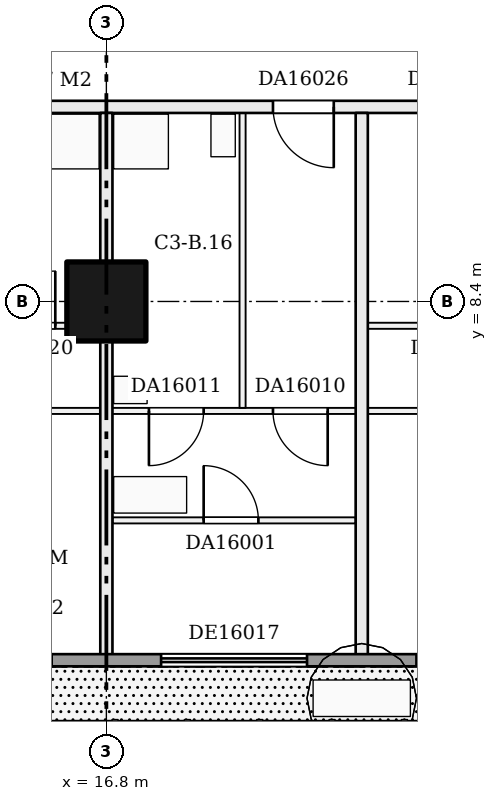
"""IFC4 building model, lengths in metres.
Left out: names, types, materials, properties, quantities, classifications, styles, units other than length and angle.
Written with IfcOpenShell. Run it as: python <this file> out.ifc"""

import sys

from ifc_helpers import new_model, si_unit, direction, frame, frame_2d, origin, origin_2d, place, context, subcontext, project, spatial, rectangle, extrude, element, fill, save


model = new_model("IFC4")
c1 = context("Model", 3, precision=1e-05, world=origin(), true_north=direction((0.0, 1.0)))
c2 = subcontext(c1, "Body", "Model", "MODEL_VIEW")
j1 = project(units=[si_unit("LENGTHUNIT", "METRE"), si_unit("PLANEANGLEUNIT", "RADIAN")], contexts=[c1])
p1 = place(None, origin())
s1 = spatial("IfcSite", under=j1, at=p1, CompositionType="ELEMENT")
p2 = place(p1, origin())
s2 = spatial("IfcBuilding", under=s1, at=p2, CompositionType="ELEMENT")
p3 = place(p2, frame((0.0, 0.0, 67.2)))
s3 = spatial("IfcBuildingStorey", under=s2, at=p3, CompositionType="ELEMENT", Elevation=67.2)
p4 = place(p3, frame((16.8, 8.4, 0.0), z_axis=(0.0, 0.0, 1.0), x_axis=(1.0, 0.0, 0.0)))
e1 = element("IfcColumn", 1, at=p4, inside=s3, PredefinedType="COLUMN", context=c2, shape_type="SweptSolid", body=[
    extrude(rectangle(XDim=1.3, YDim=1.3, at=origin_2d()), origin(), (0.0, 0.0, 1.0), 3.22),
])
p5 = place(p3, frame((16.9, 4.8, 0.0), z_axis=(0.0, 0.0, 1.0), x_axis=(1.0, 0.0, 0.0)))
e2 = element("IfcWall", 2, at=p5, inside=s3, PredefinedType="PARTITIONING", context=c2, shape_type="SweptSolid", body=[
    extrude(rectangle(XDim=4.0, YDim=0.1, at=frame_2d((2.0, 0.0))), origin(), (0.0, 0.0, 1.0), 3.22),
])
p6 = place(p5, frame((1.5, 0.0, 0.0)))
e3 = element("IfcOpeningElement", 3, at=p6, cuts=e2, PredefinedType="OPENING", context=c2, shape_type="SweptSolid", body=[
    extrude(rectangle(XDim=0.9, YDim=2.1, at=frame_2d((0.45, 1.05))), frame((0.0, 0.06, 0.0), z_axis=(0.0, -1.0, 0.0), x_axis=(1.0, 0.0, 0.0)), (0.0, 0.0, 1.0), 0.12),
])
p7 = place(p3, frame((12.65, 6.6, 0.0), z_axis=(0.0, 0.0, 1.0), x_axis=(1.0, 0.0, 0.0)))
e4 = element("IfcWall", 4, at=p7, inside=s3, PredefinedType="PARTITIONING", context=c2, shape_type="SweptSolid", body=[
    extrude(rectangle(XDim=29.25, YDim=0.1, at=frame_2d((14.625, 0.0))), origin(), (0.0, 0.0, 1.0), 3.22),
])
p8 = place(p7, frame((1.65, 0.0, 0.0)))
e5 = element("IfcOpeningElement", 5, at=p8, cuts=e4, PredefinedType="OPENING", context=c2, shape_type="SweptSolid", body=[
    extrude(rectangle(XDim=0.9, YDim=2.1, at=frame_2d((0.45, 1.05))), frame((0.0, 0.06, 0.0), z_axis=(0.0, -1.0, 0.0), x_axis=(1.0, 0.0, 0.0)), (0.0, 0.0, 1.0), 0.12),
])
p9 = place(p7, frame((6.89, 0.0, 0.0)))
e6 = element("IfcOpeningElement", 6, at=p9, cuts=e4, PredefinedType="OPENING", context=c2, shape_type="SweptSolid", body=[
    extrude(rectangle(XDim=0.9, YDim=2.1, at=frame_2d((0.45, 1.05))), frame((0.0, 0.06, 0.0), z_axis=(0.0, -1.0, 0.0), x_axis=(1.0, 0.0, 0.0)), (0.0, 0.0, 1.0), 0.12),
])
p10 = place(p7, frame((4.85, 0.0, 0.0)))
e7 = element("IfcOpeningElement", 7, at=p10, cuts=e4, PredefinedType="OPENING", context=c2, shape_type="SweptSolid", body=[
    extrude(rectangle(XDim=0.9, YDim=2.1, at=frame_2d((0.45, 1.05))), frame((0.0, 0.06, 0.0), z_axis=(0.0, -1.0, 0.0), x_axis=(1.0, 0.0, 0.0)), (0.0, 0.0, 1.0), 0.12),
])
p11 = place(p7, frame((10.05, 0.0, 0.0)))
e8 = element("IfcOpeningElement", 8, at=p11, cuts=e4, PredefinedType="OPENING", context=c2, shape_type="SweptSolid", body=[
    extrude(rectangle(XDim=0.9, YDim=2.1, at=frame_2d((0.45, 1.05))), frame((0.0, 0.06, 0.0), z_axis=(0.0, -1.0, 0.0), x_axis=(1.0, 0.0, 0.0)), (0.0, 0.0, 1.0), 0.12),
])
p12 = place(p7, frame((16.25, 0.0, 0.0)))
e9 = element("IfcOpeningElement", 9, at=p12, cuts=e4, PredefinedType="OPENING", context=c2, shape_type="SweptSolid", body=[
    extrude(rectangle(XDim=0.9, YDim=2.1, at=frame_2d((0.45, 1.05))), frame((0.0, 0.06, 0.0), z_axis=(0.0, -1.0, 0.0), x_axis=(1.0, 0.0, 0.0)), (0.0, 0.0, 1.0), 0.12),
])
p13 = place(p7, frame((22.55, 0.0, 0.0)))
e10 = element("IfcOpeningElement", 10, at=p13, cuts=e4, PredefinedType="OPENING", context=c2, shape_type="SweptSolid", body=[
    extrude(rectangle(XDim=0.9, YDim=2.1, at=frame_2d((0.45, 1.05))), frame((0.0, 0.06, 0.0), z_axis=(0.0, -1.0, 0.0), x_axis=(1.0, 0.0, 0.0)), (0.0, 0.0, 1.0), 0.12),
])
p14 = place(p7, frame((26.75, 0.0, 0.0)))
e11 = element("IfcOpeningElement", 11, at=p14, cuts=e4, PredefinedType="OPENING", context=c2, shape_type="SweptSolid", body=[
    extrude(rectangle(XDim=0.9, YDim=2.1, at=frame_2d((0.45, 1.05))), frame((0.0, 0.06, 0.0), z_axis=(0.0, -1.0, 0.0), x_axis=(1.0, 0.0, 0.0)), (0.0, 0.0, 1.0), 0.12),
])
p15 = place(p3, frame((12.65, 8.0, 0.0), z_axis=(0.0, 0.0, 1.0), x_axis=(1.0, 0.0, 0.0)))
e12 = element("IfcWall", 12, at=p15, inside=s3, PredefinedType="PARTITIONING", context=c2, shape_type="SweptSolid", body=[
    extrude(rectangle(XDim=4.05, YDim=0.1, at=frame_2d((2.025, 0.0))), origin(), (0.0, 0.0, 1.0), 3.22),
])
p16 = place(p15, frame((0.45, 0.0, 0.0)))
e13 = element("IfcOpeningElement", 13, at=p16, cuts=e12, PredefinedType="OPENING", context=c2, shape_type="SweptSolid", body=[
    extrude(rectangle(XDim=0.9, YDim=2.1, at=frame_2d((0.45, 1.05))), frame((0.0, 0.06, 0.0), z_axis=(0.0, -1.0, 0.0), x_axis=(1.0, 0.0, 0.0)), (0.0, 0.0, 1.0), 0.12),
])
p17 = place(p15, frame((2.41, 0.0, 0.0)))
e14 = element("IfcOpeningElement", 14, at=p17, cuts=e12, PredefinedType="OPENING", context=c2, shape_type="SweptSolid", body=[
    extrude(rectangle(XDim=0.9, YDim=2.1, at=frame_2d((0.45, 1.05))), frame((0.0, 0.06, 0.0), z_axis=(0.0, -1.0, 0.0), x_axis=(1.0, 0.0, 0.0)), (0.0, 0.0, 1.0), 0.12),
])
p18 = place(p3, frame((21.1, 8.0, 0.0), z_axis=(0.0, 0.0, 1.0), x_axis=(1.0, 0.0, 0.0)))
e15 = element("IfcWall", 15, at=p18, inside=s3, PredefinedType="PARTITIONING", context=c2, shape_type="SweptSolid", body=[
    extrude(rectangle(XDim=12.4, YDim=0.1, at=frame_2d((6.2, 0.0))), origin(), (0.0, 0.0, 1.0), 3.22),
])
p19 = place(p18, frame((1.0, 0.0, 0.0)))
e16 = element("IfcOpeningElement", 16, at=p19, cuts=e15, PredefinedType="OPENING", context=c2, shape_type="SweptSolid", body=[
    extrude(rectangle(XDim=0.9, YDim=2.1, at=frame_2d((0.45, 1.05))), frame((0.0, 0.06, 0.0), z_axis=(0.0, -1.0, 0.0), x_axis=(1.0, 0.0, 0.0)), (0.0, 0.0, 1.0), 0.12),
])
p20 = place(p18, frame((5.0, 0.0, 0.0)))
e17 = element("IfcOpeningElement", 17, at=p20, cuts=e15, PredefinedType="OPENING", context=c2, shape_type="SweptSolid", body=[
    extrude(rectangle(XDim=0.9, YDim=2.1, at=frame_2d((0.45, 1.05))), frame((0.0, 0.06, 0.0), z_axis=(0.0, -1.0, 0.0), x_axis=(1.0, 0.0, 0.0)), (0.0, 0.0, 1.0), 0.12),
])
p21 = place(p18, frame((7.6, 0.0, 0.0)))
e18 = element("IfcOpeningElement", 18, at=p21, cuts=e15, PredefinedType="OPENING", context=c2, shape_type="SweptSolid", body=[
    extrude(rectangle(XDim=0.9, YDim=2.1, at=frame_2d((0.45, 1.05))), frame((0.0, 0.06, 0.0), z_axis=(0.0, -1.0, 0.0), x_axis=(1.0, 0.0, 0.0)), (0.0, 0.0, 1.0), 0.12),
])
p22 = place(p18, frame((10.7, 0.0, 0.0)))
e19 = element("IfcOpeningElement", 19, at=p22, cuts=e15, PredefinedType="OPENING", context=c2, shape_type="SweptSolid", body=[
    extrude(rectangle(XDim=0.9, YDim=2.1, at=frame_2d((0.45, 1.05))), frame((0.0, 0.06, 0.0), z_axis=(0.0, -1.0, 0.0), x_axis=(1.0, 0.0, 0.0)), (0.0, 0.0, 1.0), 0.12),
])
p23 = place(p3, frame((11.5, 11.6, 0.0), z_axis=(0.0, 0.0, 1.0), x_axis=(1.0, 0.0, 0.0)))
e20 = element("IfcWall", 20, at=p23, inside=s3, PredefinedType="PARTITIONING", context=c2, shape_type="SweptSolid", body=[
    extrude(rectangle(XDim=30.5, YDim=0.2, at=frame_2d((15.25, 0.0))), origin(), (0.0, 0.0, 1.0), 3.22),
])
p24 = place(p23, frame((1.6, 0.0, 0.0)))
e21 = element("IfcOpeningElement", 21, at=p24, cuts=e20, PredefinedType="OPENING", context=c2, shape_type="SweptSolid", body=[
    extrude(rectangle(XDim=1.0, YDim=2.1, at=frame_2d((0.5, 1.05))), frame((0.0, 0.11, 0.0), z_axis=(0.0, -1.0, 0.0), x_axis=(1.0, 0.0, 0.0)), (0.0, 0.0, 1.0), 0.22),
])
p25 = place(p23, frame((8.04, 0.0, 0.0)))
e22 = element("IfcOpeningElement", 22, at=p25, cuts=e20, PredefinedType="OPENING", context=c2, shape_type="SweptSolid", body=[
    extrude(rectangle(XDim=1.0, YDim=2.1, at=frame_2d((0.5, 1.05))), frame((0.0, 0.11, 0.0), z_axis=(0.0, -1.0, 0.0), x_axis=(1.0, 0.0, 0.0)), (0.0, 0.0, 1.0), 0.22),
])
p26 = place(p23, frame((10.5, 0.0, 0.0)))
e23 = element("IfcOpeningElement", 23, at=p26, cuts=e20, PredefinedType="OPENING", context=c2, shape_type="SweptSolid", body=[
    extrude(rectangle(XDim=1.0, YDim=2.1, at=frame_2d((0.5, 1.05))), frame((0.0, 0.11, 0.0), z_axis=(0.0, -1.0, 0.0), x_axis=(1.0, 0.0, 0.0)), (0.0, 0.0, 1.0), 0.22),
])
p27 = place(p23, frame((28.733, 0.0, 0.0)))
e24 = element("IfcOpeningElement", 24, at=p27, cuts=e20, PredefinedType="OPENING", context=c2, shape_type="SweptSolid", body=[
    extrude(rectangle(XDim=1.0, YDim=2.1, at=frame_2d((0.5, 1.05))), frame((0.0, 0.11, 0.0), z_axis=(0.0, -1.0, 0.0), x_axis=(1.0, 0.0, 0.0)), (0.0, 0.0, 1.0), 0.22),
])
p28 = place(p3, frame((16.8, 2.5, 0.0), z_axis=(0.0, 0.0, 1.0), x_axis=(0.0, 1.0, 0.0)))
e25 = element("IfcWall", 25, at=p28, inside=s3, PredefinedType="PARTITIONING", context=c2, shape_type="SweptSolid", body=[
    extrude(rectangle(XDim=9.0, YDim=0.2, at=frame_2d((4.5, 0.0))), origin(), (0.0, 0.0, 1.0), 3.22),
])
p29 = place(p3, frame((19.04, 6.65, 0.0), z_axis=(0.0, 0.0, 1.0), x_axis=(0.0, 1.0, 0.0)))
e26 = element("IfcWall", 26, at=p29, inside=s3, PredefinedType="PARTITIONING", context=c2, shape_type="SweptSolid", body=[
    extrude(rectangle(XDim=4.85, YDim=0.1, at=frame_2d((2.425, 0.0))), origin(), (0.0, 0.0, 1.0), 3.22),
])
p30 = place(p3, frame((21.0, 2.5, 0.0), z_axis=(0.0, 0.0, 1.0), x_axis=(0.0, 1.0, 0.0)))
e27 = element("IfcWall", 27, at=p30, inside=s3, PredefinedType="PARTITIONING", context=c2, shape_type="SweptSolid", body=[
    extrude(rectangle(XDim=9.0, YDim=0.2, at=frame_2d((4.5, 0.0))), origin(), (0.0, 0.0, 1.0), 3.22),
])
p31 = place(p3, frame((4.8, 2.5, 0.0), z_axis=(0.0, 0.0, 1.0), x_axis=(1.0, 0.0, 0.0)))
e28 = element("IfcWall", 28, at=p31, inside=s3, PredefinedType="SOLIDWALL", context=c2, shape_type="SweptSolid", body=[
    extrude(rectangle(XDim=57.6, YDim=0.2, at=frame_2d((28.8, 0.0))), origin(), (0.0, 0.0, 1.0), 3.22),
])
p32 = place(p31, frame((0.3, 0.0, 0.0)))
e29 = element("IfcOpeningElement", 29, at=p32, cuts=e28, PredefinedType="OPENING", context=c2, shape_type="SweptSolid", body=[
    extrude(rectangle(XDim=2.4, YDim=2.2, at=frame_2d((1.2, 1.1))), frame((0.0, 0.11, 0.0), z_axis=(0.0, -1.0, 0.0), x_axis=(1.0, 0.0, 0.0)), (0.0, 0.0, 1.0), 0.22),
])
p33 = place(p31, frame((4.5, 0.0, 0.9)))
e30 = element("IfcOpeningElement", 30, at=p33, cuts=e28, PredefinedType="OPENING", context=c2, shape_type="SweptSolid", body=[
    extrude(rectangle(XDim=2.4, YDim=1.5, at=frame_2d((1.2, 0.75))), frame((0.0, 0.11, 0.0), z_axis=(0.0, -1.0, 0.0), x_axis=(1.0, 0.0, 0.0)), (0.0, 0.0, 1.0), 0.22),
])
p34 = place(p31, frame((8.7, 0.0, 0.9)))
e31 = element("IfcOpeningElement", 31, at=p34, cuts=e28, PredefinedType="OPENING", context=c2, shape_type="SweptSolid", body=[
    extrude(rectangle(XDim=2.4, YDim=1.5, at=frame_2d((1.2, 0.75))), frame((0.0, 0.11, 0.0), z_axis=(0.0, -1.0, 0.0), x_axis=(1.0, 0.0, 0.0)), (0.0, 0.0, 1.0), 0.22),
])
p35 = place(p31, frame((12.9, 0.0, 0.0)))
e32 = element("IfcOpeningElement", 32, at=p35, cuts=e28, PredefinedType="OPENING", context=c2, shape_type="SweptSolid", body=[
    extrude(rectangle(XDim=2.4, YDim=2.2, at=frame_2d((1.2, 1.1))), frame((0.0, 0.11, 0.0), z_axis=(0.0, -1.0, 0.0), x_axis=(1.0, 0.0, 0.0)), (0.0, 0.0, 1.0), 0.22),
])
p36 = place(p31, frame((17.1, 0.0, 0.9)))
e33 = element("IfcOpeningElement", 33, at=p36, cuts=e28, PredefinedType="OPENING", context=c2, shape_type="SweptSolid", body=[
    extrude(rectangle(XDim=2.4, YDim=1.5, at=frame_2d((1.2, 0.75))), frame((0.0, 0.11, 0.0), z_axis=(0.0, -1.0, 0.0), x_axis=(1.0, 0.0, 0.0)), (0.0, 0.0, 1.0), 0.22),
])
p37 = place(p31, frame((21.3, 0.0, 0.0)))
e34 = element("IfcOpeningElement", 34, at=p37, cuts=e28, PredefinedType="OPENING", context=c2, shape_type="SweptSolid", body=[
    extrude(rectangle(XDim=2.4, YDim=2.2, at=frame_2d((1.2, 1.1))), frame((0.0, 0.11, 0.0), z_axis=(0.0, -1.0, 0.0), x_axis=(1.0, 0.0, 0.0)), (0.0, 0.0, 1.0), 0.22),
])
p38 = place(p31, frame((25.5, 0.0, 0.0)))
e35 = element("IfcOpeningElement", 35, at=p38, cuts=e28, PredefinedType="OPENING", context=c2, shape_type="SweptSolid", body=[
    extrude(rectangle(XDim=2.4, YDim=2.2, at=frame_2d((1.2, 1.1))), frame((0.0, 0.11, 0.0), z_axis=(0.0, -1.0, 0.0), x_axis=(1.0, 0.0, 0.0)), (0.0, 0.0, 1.0), 0.22),
])
p39 = place(p31, frame((29.7, 0.0, 0.0)))
e36 = element("IfcOpeningElement", 36, at=p39, cuts=e28, PredefinedType="OPENING", context=c2, shape_type="SweptSolid", body=[
    extrude(rectangle(XDim=2.4, YDim=2.2, at=frame_2d((1.2, 1.1))), frame((0.0, 0.11, 0.0), z_axis=(0.0, -1.0, 0.0), x_axis=(1.0, 0.0, 0.0)), (0.0, 0.0, 1.0), 0.22),
])
p40 = place(p31, frame((33.9, 0.0, 0.9)))
e37 = element("IfcOpeningElement", 37, at=p40, cuts=e28, PredefinedType="OPENING", context=c2, shape_type="SweptSolid", body=[
    extrude(rectangle(XDim=2.4, YDim=1.5, at=frame_2d((1.2, 0.75))), frame((0.0, 0.11, 0.0), z_axis=(0.0, -1.0, 0.0), x_axis=(1.0, 0.0, 0.0)), (0.0, 0.0, 1.0), 0.22),
])
p41 = place(p31, frame((38.1, 0.0, 0.0)))
e38 = element("IfcOpeningElement", 38, at=p41, cuts=e28, PredefinedType="OPENING", context=c2, shape_type="SweptSolid", body=[
    extrude(rectangle(XDim=2.4, YDim=2.2, at=frame_2d((1.2, 1.1))), frame((0.0, 0.11, 0.0), z_axis=(0.0, -1.0, 0.0), x_axis=(1.0, 0.0, 0.0)), (0.0, 0.0, 1.0), 0.22),
])
p42 = place(p31, frame((42.3, 0.0, 0.9)))
e39 = element("IfcOpeningElement", 39, at=p42, cuts=e28, PredefinedType="OPENING", context=c2, shape_type="SweptSolid", body=[
    extrude(rectangle(XDim=2.4, YDim=1.5, at=frame_2d((1.2, 0.75))), frame((0.0, 0.11, 0.0), z_axis=(0.0, -1.0, 0.0), x_axis=(1.0, 0.0, 0.0)), (0.0, 0.0, 1.0), 0.22),
])
p43 = place(p31, frame((46.5, 0.0, 0.9)))
e40 = element("IfcOpeningElement", 40, at=p43, cuts=e28, PredefinedType="OPENING", context=c2, shape_type="SweptSolid", body=[
    extrude(rectangle(XDim=2.4, YDim=1.5, at=frame_2d((1.2, 0.75))), frame((0.0, 0.11, 0.0), z_axis=(0.0, -1.0, 0.0), x_axis=(1.0, 0.0, 0.0)), (0.0, 0.0, 1.0), 0.22),
])
p44 = place(p31, frame((50.7, 0.0, 0.0)))
e41 = element("IfcOpeningElement", 41, at=p44, cuts=e28, PredefinedType="OPENING", context=c2, shape_type="SweptSolid", body=[
    extrude(rectangle(XDim=2.4, YDim=2.2, at=frame_2d((1.2, 1.1))), frame((0.0, 0.11, 0.0), z_axis=(0.0, -1.0, 0.0), x_axis=(1.0, 0.0, 0.0)), (0.0, 0.0, 1.0), 0.22),
])
p45 = place(p31, frame((54.9, 0.0, 0.9)))
e42 = element("IfcOpeningElement", 42, at=p45, cuts=e28, PredefinedType="OPENING", context=c2, shape_type="SweptSolid", body=[
    extrude(rectangle(XDim=2.4, YDim=1.5, at=frame_2d((1.2, 0.75))), frame((0.0, 0.11, 0.0), z_axis=(0.0, -1.0, 0.0), x_axis=(1.0, 0.0, 0.0)), (0.0, 0.0, 1.0), 0.22),
])
p46 = place(p6, origin())
e43 = element("IfcDoor", 43, at=p46, inside=s3, OperationType="SINGLE_SWING_LEFT", PredefinedType="DOOR", context=c2, shape_type="SweptSolid", body=[
    extrude(rectangle(XDim=0.9, YDim=2.1, at=frame_2d((0.45, 1.05))), frame((0.0, 0.025, 0.0), z_axis=(0.0, -1.0, 0.0), x_axis=(1.0, 0.0, 0.0)), (0.0, 0.0, 1.0), 0.05),
])
fill(e3, e43)
p47 = place(p9, frame((0.9, 0.0, 0.0), z_axis=(0.0, 0.0, 1.0), x_axis=(-1.0, 0.0, 0.0)))
e44 = element("IfcDoor", 44, at=p47, inside=s3, OperationType="SINGLE_SWING_LEFT", PredefinedType="DOOR", context=c2, shape_type="SweptSolid", body=[
    extrude(rectangle(XDim=0.9, YDim=2.1, at=frame_2d((0.45, 1.05))), frame((0.0, 0.025, 0.0), z_axis=(0.0, -1.0, 0.0), x_axis=(1.0, 0.0, 0.0)), (0.0, 0.0, 1.0), 0.05),
])
fill(e6, e44)
p48 = place(p10, frame((0.9, 0.0, 0.0), z_axis=(0.0, 0.0, 1.0), x_axis=(-1.0, 0.0, 0.0)))
e45 = element("IfcDoor", 45, at=p48, inside=s3, OperationType="SINGLE_SWING_RIGHT", PredefinedType="DOOR", context=c2, shape_type="SweptSolid", body=[
    extrude(rectangle(XDim=0.9, YDim=2.1, at=frame_2d((0.45, 1.05))), frame((0.0, 0.025, 0.0), z_axis=(0.0, -1.0, 0.0), x_axis=(1.0, 0.0, 0.0)), (0.0, 0.0, 1.0), 0.05),
])
fill(e7, e45)
p49 = place(p17, origin())
e46 = element("IfcDoor", 46, at=p49, inside=s3, OperationType="SINGLE_SWING_RIGHT", PredefinedType="DOOR", context=c2, shape_type="SweptSolid", body=[
    extrude(rectangle(XDim=0.9, YDim=2.1, at=frame_2d((0.45, 1.05))), frame((0.0, 0.025, 0.0), z_axis=(0.0, -1.0, 0.0), x_axis=(1.0, 0.0, 0.0)), (0.0, 0.0, 1.0), 0.05),
])
fill(e14, e46)
p50 = place(p25, frame((1.0, 0.0, 0.0), z_axis=(0.0, 0.0, 1.0), x_axis=(-1.0, 0.0, 0.0)))
e47 = element("IfcDoor", 47, at=p50, inside=s3, OperationType="SINGLE_SWING_LEFT", PredefinedType="DOOR", context=c2, shape_type="SweptSolid", body=[
    extrude(rectangle(XDim=1.0, YDim=2.1, at=frame_2d((0.5, 1.05))), frame((0.0, 0.025, 0.0), z_axis=(0.0, -1.0, 0.0), x_axis=(1.0, 0.0, 0.0)), (0.0, 0.0, 1.0), 0.05),
])
fill(e22, e47)
p51 = place(p35, origin())
e48 = element("IfcDoor", 48, at=p51, inside=s3, OperationType="DOUBLE_DOOR_SLIDING", PredefinedType="DOOR", context=c2, shape_type="SweptSolid", body=[
    extrude(rectangle(XDim=2.4, YDim=2.2, at=frame_2d((1.2, 1.1))), frame((0.0, 0.025, 0.0), z_axis=(0.0, -1.0, 0.0), x_axis=(1.0, 0.0, 0.0)), (0.0, 0.0, 1.0), 0.05),
])
fill(e32, e48)
save(model, sys.argv[1])
